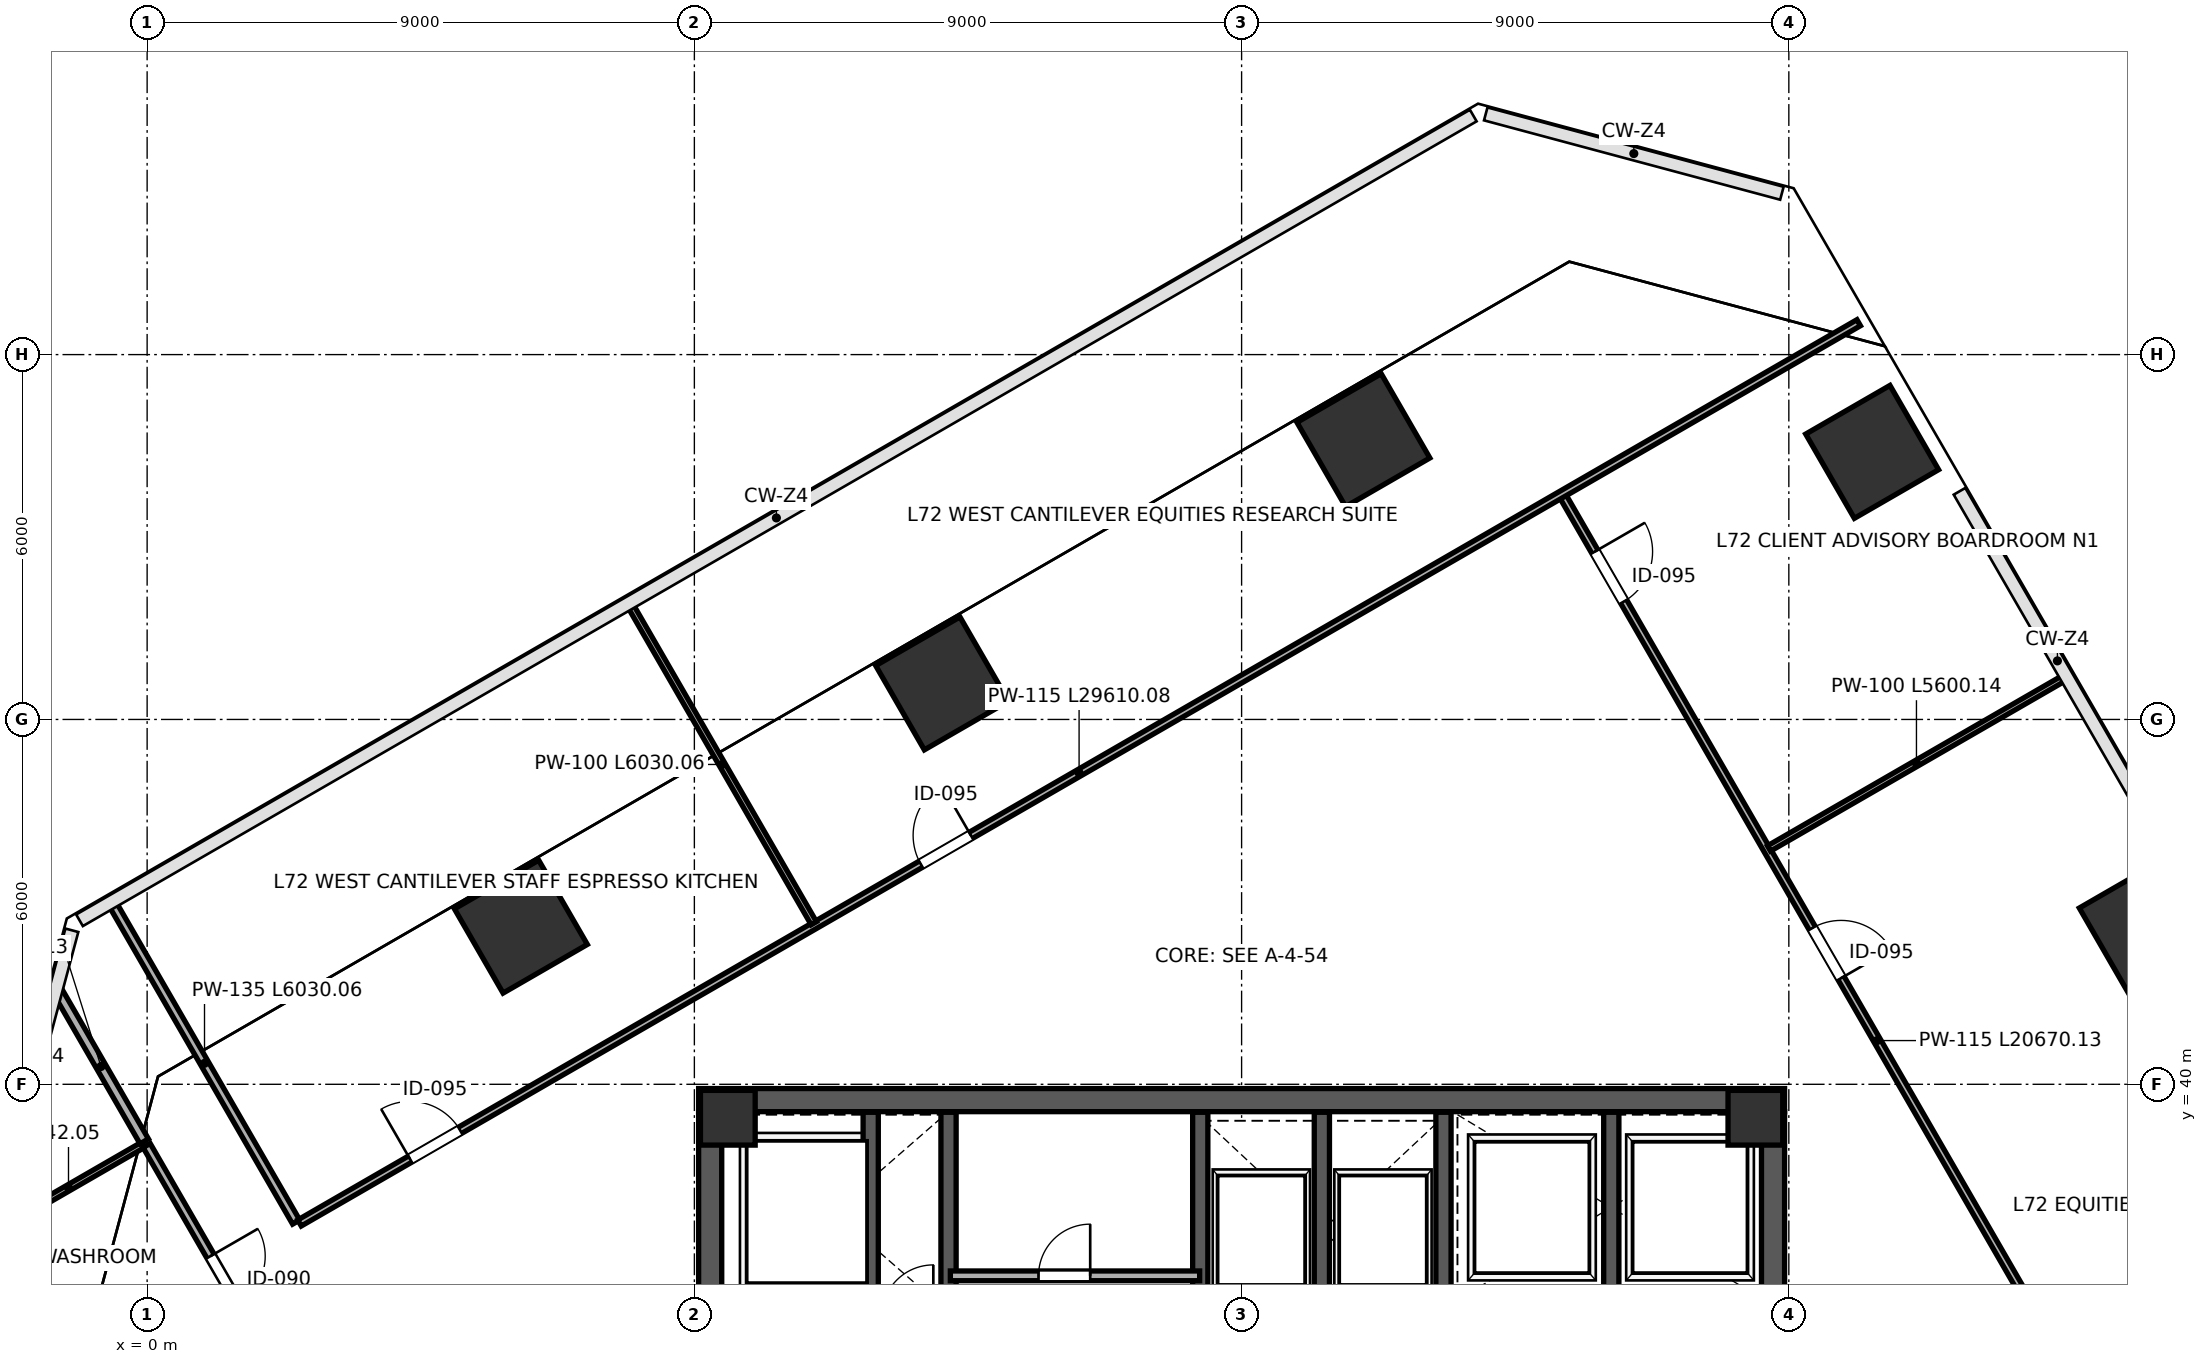
"""IFC4 building model, lengths in metres.
Left out: names, types, materials, properties, quantities, classifications, styles, units other than length and angle.
Written with IfcOpenShell. Run it as: python <this file> out.ifc"""

import sys

from ifc_helpers import new_model, si_unit, direction, frame, frame_2d, origin, origin_2d, place, context, subcontext, project, spatial, rectangle, extrude, source, transform, mapped, element, fill, save


model = new_model("IFC4")
c1 = context("Model", 3, precision=1e-05, world=origin(), true_north=direction((0.0, 1.0)))
c2 = subcontext(c1, "Body", "Model", "MODEL_VIEW")
j1 = project(units=[si_unit("LENGTHUNIT", "METRE"), si_unit("PLANEANGLEUNIT", "RADIAN")], contexts=[c1])
p1 = place(None, origin())
s1 = spatial("IfcSite", under=j1, at=p1, CompositionType="ELEMENT")
p2 = place(p1, origin())
s2 = spatial("IfcBuilding", under=s1, at=p2, CompositionType="ELEMENT")
p3 = place(p2, frame((0.0, 0.0, 319.8)))
s3 = spatial("IfcBuildingStorey", under=s2, at=p3, CompositionType="ELEMENT", Elevation=319.8)
m1 = source(origin(), c2, "Body", "SweptSolid", [
    extrude(rectangle(XDim=0.9, YDim=0.9, at=origin_2d()), origin(), (0.0, 0.0, 1.0), 4.198),
])
for number, where, z_axis, x_axis in (
    (1, (9.55, 39.45, 0.001), (0.0, 0.0, 1.0), (1.0, 0.0, 0.0)),
    (2, (26.45, 39.45, 0.001), (0.0, 0.0, 1.0), (1.0, 0.0, 0.0)),
):
    element("IfcColumn", number, at=place(p3, frame(where, z_axis=z_axis, x_axis=x_axis)), inside=s3, PredefinedType="COLUMN", context=c2, shape_type="MappedRepresentation", body=[
        mapped(m1, transform((0.0, 0.0, 0.0), scale=1.0)),
    ])
m2 = source(origin(), c2, "Body", "SweptSolid", [
    extrude(rectangle(XDim=1.6, YDim=1.6, at=origin_2d()), origin(), (0.0, 0.0, 1.0), 4.198),
])
for number, where, z_axis, x_axis in (
    (3, (28.37, 50.4, 0.001), (0.0, 0.0, 1.0), (-0.5, 0.866, 0.0)),
    (4, (32.87, 42.606, 0.001), (0.0, 0.0, 1.0), (-0.5, 0.866, 0.0)),
    (5, (6.147, 42.593, 0.001), (0.0, 0.0, 1.0), (-0.5, 0.866, 0.0)),
    (6, (13.075, 46.593, 0.001), (0.0, 0.0, 1.0), (-0.5, 0.866, 0.0)),
    (7, (20.003, 50.593, 0.001), (0.0, 0.0, 1.0), (-0.5, 0.866, 0.0)),
):
    element("IfcColumn", number, at=place(p3, frame(where, z_axis=z_axis, x_axis=x_axis)), inside=s3, PredefinedType="COLUMN", context=c2, shape_type="MappedRepresentation", body=[
        mapped(m2, transform((0.0, 0.0, 0.0), scale=1.0)),
    ])
p4 = place(p3, frame((9.26, 24.45, 0.0), z_axis=(0.0, 0.0, 1.0), x_axis=(0.0, 1.0, 0.0)))
e8 = element("IfcWall", 8, at=p4, inside=s3, PredefinedType="SHEAR", context=c2, shape_type="SweptSolid", body=[
    extrude(rectangle(XDim=15.1, YDim=0.38, at=frame_2d((7.55, 0.0))), origin(), (0.0, 0.0, 1.0), 3.96),
])
p5 = place(p4, frame((8.7, 0.0, 0.0)))
e9 = element("IfcOpeningElement", 9, at=p5, cuts=e8, PredefinedType="OPENING", context=c2, shape_type="SweptSolid", body=[
    extrude(rectangle(XDim=1.15, YDim=2.2, at=frame_2d((0.575, 1.1))), frame((0.0, 0.2, 0.0), z_axis=(0.0, -1.0, 0.0), x_axis=(1.0, 0.0, 0.0)), (0.0, 0.0, 1.0), 0.4),
])
p6 = place(p3, frame((26.74, 24.45, 0.0), z_axis=(0.0, 0.0, 1.0), x_axis=(0.0, 1.0, 0.0)))
e10 = element("IfcWall", 10, at=p6, inside=s3, PredefinedType="SHEAR", context=c2, shape_type="SweptSolid", body=[
    extrude(rectangle(XDim=15.1, YDim=0.38, at=frame_2d((7.55, 0.0))), origin(), (0.0, 0.0, 1.0), 3.96),
])
p7 = place(p6, frame((8.6, 0.0, 0.0)))
e11 = element("IfcOpeningElement", 11, at=p7, cuts=e10, PredefinedType="OPENING", context=c2, shape_type="SweptSolid", body=[
    extrude(rectangle(XDim=1.15, YDim=2.2, at=frame_2d((0.575, 1.1))), frame((0.0, 0.2, 0.0), z_axis=(0.0, -1.0, 0.0), x_axis=(1.0, 0.0, 0.0)), (0.0, 0.0, 1.0), 0.4),
])
p8 = place(p3, frame((9.07, 39.74, 0.0), z_axis=(0.0, 0.0, 1.0), x_axis=(1.0, 0.0, 0.0)))
e12 = element("IfcWall", 12, at=p8, inside=s3, PredefinedType="SHEAR", context=c2, shape_type="SweptSolid", body=[
    extrude(rectangle(XDim=17.86, YDim=0.38, at=frame_2d((8.93, 0.0))), origin(), (0.0, 0.0, 1.0), 3.96),
])
p9 = place(p3, frame((21.32, 32.12, 0.0), z_axis=(0.0, 0.0, 1.0), x_axis=(0.0, 1.0, 0.0)))
e13 = element("IfcWall", 13, at=p9, inside=s3, PredefinedType="SHEAR", context=c2, shape_type="SweptSolid", body=[
    extrude(rectangle(XDim=7.42, YDim=0.25, at=frame_2d((3.71, 0.0))), origin(), (0.0, 0.0, 1.0), 3.96),
])
p10 = place(p9, frame((1.4, 0.0, 0.0)))
e14 = element("IfcOpeningElement", 14, at=p10, cuts=e13, PredefinedType="OPENING", context=c2, shape_type="SweptSolid", body=[
    extrude(rectangle(XDim=1.15, YDim=2.2, at=frame_2d((0.575, 1.1))), frame((0.0, 0.135, 0.0), z_axis=(0.0, -1.0, 0.0), x_axis=(1.0, 0.0, 0.0)), (0.0, 0.0, 1.0), 0.27),
])
p11 = place(p3, frame((11.9, 36.31, 0.0), z_axis=(0.0, 0.0, 1.0), x_axis=(0.0, 1.0, 0.0)))
e15 = element("IfcWall", 15, at=p11, inside=s3, PredefinedType="SHEAR", context=c2, shape_type="SweptSolid", body=[
    extrude(rectangle(XDim=3.23, YDim=0.25, at=frame_2d((1.615, 0.0))), origin(), (0.0, 0.0, 1.0), 3.96),
])
p12 = place(p3, frame((24.08, 36.48, 0.0), z_axis=(0.0, 0.0, 1.0), x_axis=(0.0, 1.0, 0.0)))
e16 = element("IfcWall", 16, at=p12, inside=s3, PredefinedType="SHEAR", context=c2, shape_type="SweptSolid", body=[
    extrude(rectangle(XDim=3.06, YDim=0.25, at=frame_2d((1.53, 0.0))), origin(), (0.0, 0.0, 1.0), 3.96),
])
p13 = place(p3, frame((13.18, 36.2, 0.0), z_axis=(0.0, 0.0, 1.0), x_axis=(0.0, 1.0, 0.0)))
e17 = element("IfcWall", 17, at=p13, inside=s3, PredefinedType="SHEAR", context=c2, shape_type="SweptSolid", body=[
    extrude(rectangle(XDim=3.34, YDim=0.25, at=frame_2d((1.67, 0.0))), origin(), (0.0, 0.0, 1.0), 3.96),
])
for number, where, z_axis, x_axis in (
    (18, (17.32, 35.81, 0.0), (0.0, 0.0, 1.0), (0.0, 1.0, 0.0)),
    (19, (19.32, 35.81, 0.0), (0.0, 0.0, 1.0), (0.0, 1.0, 0.0)),
):
    element("IfcWall", number, at=place(p3, frame(where, z_axis=z_axis, x_axis=x_axis)), inside=s3, PredefinedType="SHEAR", context=c2, shape_type="SweptSolid", body=[
        extrude(rectangle(XDim=3.73, YDim=0.25, at=frame_2d((1.865, 0.0))), origin(), (0.0, 0.0, 1.0), 3.96),
    ])
p14 = place(p3, frame((13.21, 36.85, 0.0), z_axis=(0.0, 0.0, 1.0), x_axis=(1.0, 0.0, 0.0)))
e20 = element("IfcWall", 20, at=p14, inside=s3, PredefinedType="PARTITIONING", context=c2, shape_type="SweptSolid", body=[
    extrude(rectangle(XDim=4.1, YDim=0.16, at=frame_2d((2.05, 0.0))), origin(), (0.0, 0.0, 1.0), 3.96),
])
p15 = place(p14, frame((1.45, 0.0, 0.0)))
e21 = element("IfcOpeningElement", 21, at=p15, cuts=e20, PredefinedType="OPENING", context=c2, shape_type="SweptSolid", body=[
    extrude(rectangle(XDim=0.85, YDim=2.1, at=frame_2d((0.425, 1.05))), frame((0.0, 0.09, 0.0), z_axis=(0.0, -1.0, 0.0), x_axis=(1.0, 0.0, 0.0)), (0.0, 0.0, 1.0), 0.18),
])
p16 = place(p3, frame((-2.524, 37.586, 0.0), z_axis=(0.0, 0.0, 1.0), x_axis=(0.866019653938, 0.500009958894, 0.0)))
e22 = element("IfcWall", 22, at=p16, inside=s3, PredefinedType="PARTITIONING", context=c2, shape_type="SweptSolid", body=[
    extrude(rectangle(XDim=2.842, YDim=0.1, at=frame_2d((1.421, 0.0))), origin(), (0.0, 0.0, 1.0), 3.96),
])
p17 = place(p3, frame((-1.469, 41.523, 0.0), z_axis=(0.0, 0.0, 1.0), x_axis=(0.499945532396, -0.866056848387, 0.0)))
e23 = element("IfcWall", 23, at=p17, inside=s3, PredefinedType="PARTITIONING", context=c2, shape_type="SweptSolid", body=[
    extrude(rectangle(XDim=2.842, YDim=0.16, at=frame_2d((1.421, 0.0))), origin(), (0.0, 0.0, 1.0), 3.96),
])
p18 = place(p3, frame((-0.008, 38.993, 0.0), z_axis=(0.0, 0.0, 1.0), x_axis=(0.49998923004, -0.866031621735, 0.0)))
e24 = element("IfcWall", 24, at=p18, inside=s3, PredefinedType="PARTITIONING", context=c2, shape_type="SweptSolid", body=[
    extrude(rectangle(XDim=7.42, YDim=0.135, at=frame_2d((3.71, 0.0))), origin(), (0.0, 0.0, 1.0), 3.96),
])
p19 = place(p18, frame((2.1, 0.0, 0.0)))
e25 = element("IfcOpeningElement", 25, at=p19, cuts=e24, PredefinedType="OPENING", context=c2, shape_type="SweptSolid", body=[
    extrude(rectangle(XDim=0.9, YDim=2.15, at=frame_2d((0.45, 1.075))), frame((0.0, 0.078, 0.0), z_axis=(0.0, -1.0, 0.0), x_axis=(1.0, 0.0, 0.0)), (0.0, 0.0, 1.0), 0.155),
])
p20 = place(p18, frame((5.4, 0.0, 0.0)))
e26 = element("IfcOpeningElement", 26, at=p20, cuts=e24, PredefinedType="OPENING", context=c2, shape_type="SweptSolid", body=[
    extrude(rectangle(XDim=0.95, YDim=2.15, at=frame_2d((0.475, 1.075))), frame((0.0, 0.078, 0.0), z_axis=(0.0, -1.0, 0.0), x_axis=(1.0, 0.0, 0.0)), (0.0, 0.0, 1.0), 0.155),
])
p21 = place(p3, frame((23.284, 49.669, 0.0), z_axis=(0.0, 0.0, 1.0), x_axis=(0.500004637929, -0.866022726058, 0.0)))
e27 = element("IfcWall", 27, at=p21, inside=s3, PredefinedType="PARTITIONING", context=c2, shape_type="SweptSolid", body=[
    extrude(rectangle(XDim=20.67, YDim=0.115, at=frame_2d((10.335, 0.0))), origin(), (0.0, 0.0, 1.0), 3.96),
])
p22 = place(p21, frame((1.05, 0.0, 0.0)))
e28 = element("IfcOpeningElement", 28, at=p22, cuts=e27, PredefinedType="OPENING", context=c2, shape_type="SweptSolid", body=[
    extrude(rectangle(XDim=0.95, YDim=2.15, at=frame_2d((0.475, 1.075))), frame((0.0, 0.067, 0.0), z_axis=(0.0, -1.0, 0.0), x_axis=(1.0, 0.0, 0.0)), (0.0, 0.0, 1.0), 0.135),
])
p23 = place(p21, frame((8.2, 0.0, 0.0)))
e29 = element("IfcOpeningElement", 29, at=p23, cuts=e27, PredefinedType="OPENING", context=c2, shape_type="SweptSolid", body=[
    extrude(rectangle(XDim=0.95, YDim=2.15, at=frame_2d((0.475, 1.075))), frame((0.0, 0.067, 0.0), z_axis=(0.0, -1.0, 0.0), x_axis=(1.0, 0.0, 0.0)), (0.0, 0.0, 1.0), 0.135),
])
p24 = place(p3, frame((26.674, 43.878, 0.0), z_axis=(0.0, 0.0, 1.0), x_axis=(0.866026594901, 0.49999793692, 0.0)))
e30 = element("IfcWall", 30, at=p24, inside=s3, PredefinedType="PARTITIONING", context=c2, shape_type="SweptSolid", body=[
    extrude(rectangle(XDim=5.6, YDim=0.1, at=frame_2d((2.8, 0.0))), origin(), (0.0, 0.0, 1.0), 3.295),
])
p25 = place(p3, frame((-0.564, 42.956, 0.0), z_axis=(0.0, 0.0, 1.0), x_axis=(0.500014506688, -0.866017028182, 0.0)))
e31 = element("IfcWall", 31, at=p25, inside=s3, PredefinedType="PARTITIONING", context=c2, shape_type="SweptSolid", body=[
    extrude(rectangle(XDim=6.03, YDim=0.135, at=frame_2d((3.015, 0.0))), origin(), (0.0, 0.0, 1.0), 3.96),
])
p26 = place(p3, frame((2.506, 37.719, 0.0), z_axis=(0.0, 0.0, 1.0), x_axis=(0.866023290802, 0.500003659775, 0.0)))
e32 = element("IfcWall", 32, at=p26, inside=s3, PredefinedType="PARTITIONING", context=c2, shape_type="SweptSolid", body=[
    extrude(rectangle(XDim=29.61, YDim=0.115, at=frame_2d((14.805, 0.0))), origin(), (0.0, 0.0, 1.0), 3.96),
])
p27 = place(p26, frame((2.1, 0.0, 0.0)))
e33 = element("IfcOpeningElement", 33, at=p27, cuts=e32, PredefinedType="OPENING", context=c2, shape_type="SweptSolid", body=[
    extrude(rectangle(XDim=0.95, YDim=2.15, at=frame_2d((0.475, 1.075))), frame((0.0, 0.067, 0.0), z_axis=(0.0, -1.0, 0.0), x_axis=(1.0, 0.0, 0.0)), (0.0, 0.0, 1.0), 0.135),
])
p28 = place(p26, frame((11.8, 0.0, 0.0)))
e34 = element("IfcOpeningElement", 34, at=p28, cuts=e32, PredefinedType="OPENING", context=c2, shape_type="SweptSolid", body=[
    extrude(rectangle(XDim=0.95, YDim=2.15, at=frame_2d((0.475, 1.075))), frame((0.0, 0.067, 0.0), z_axis=(0.0, -1.0, 0.0), x_axis=(1.0, 0.0, 0.0)), (0.0, 0.0, 1.0), 0.135),
])
p29 = place(p3, frame((7.949, 47.871, 0.0), z_axis=(0.0, 0.0, 1.0), x_axis=(0.4999841411, -0.866034559731, 0.0)))
e35 = element("IfcWall", 35, at=p29, inside=s3, PredefinedType="PARTITIONING", context=c2, shape_type="SweptSolid", body=[
    extrude(rectangle(XDim=6.03, YDim=0.1, at=frame_2d((3.015, 0.0))), origin(), (0.0, 0.0, 1.0), 3.295),
])
m3 = source(origin(), c2, "Body", "SweptSolid", [
    extrude(rectangle(XDim=0.85, YDim=2.1, at=frame_2d((0.425, 1.05))), frame((0.0, 0.025, 0.0), z_axis=(0.0, -1.0, 0.0), x_axis=(1.0, 0.0, 0.0)), (0.0, 0.0, 1.0), 0.05),
])
p30 = place(p15, origin())
e36 = element("IfcDoor", 36, at=p30, inside=s3, OperationType="SINGLE_SWING_RIGHT", PredefinedType="DOOR", context=c2, shape_type="MappedRepresentation", body=[
    mapped(m3, transform((0.0, 0.0, 0.0), scale=1.0)),
])
fill(e21, e36)
m4 = source(origin(), c2, "Body", "SweptSolid", [
    extrude(rectangle(XDim=0.9, YDim=2.15, at=frame_2d((0.45, 1.075))), frame((0.0, 0.025, 0.0), z_axis=(0.0, -1.0, 0.0), x_axis=(1.0, 0.0, 0.0)), (0.0, 0.0, 1.0), 0.05),
])
p31 = place(p19, origin())
e37 = element("IfcDoor", 37, at=p31, inside=s3, OperationType="SINGLE_SWING_LEFT", PredefinedType="DOOR", context=c2, shape_type="MappedRepresentation", body=[
    mapped(m4, transform((0.0, 0.0, 0.0), scale=1.0)),
])
fill(e25, e37)
m5 = source(origin(), c2, "Body", "SweptSolid", [
    extrude(rectangle(XDim=0.95, YDim=2.15, at=frame_2d((0.475, 1.075))), frame((0.0, 0.025, 0.0), z_axis=(0.0, -1.0, 0.0), x_axis=(1.0, 0.0, 0.0)), (0.0, 0.0, 1.0), 0.05),
])
p32 = place(p22, origin())
e38 = element("IfcDoor", 38, at=p32, inside=s3, OperationType="SINGLE_SWING_LEFT", PredefinedType="DOOR", context=c2, shape_type="MappedRepresentation", body=[
    mapped(m5, transform((0.0, 0.0, 0.0), scale=1.0)),
])
fill(e28, e38)
p33 = place(p23, origin())
e39 = element("IfcDoor", 39, at=p33, inside=s3, OperationType="SINGLE_SWING_RIGHT", PredefinedType="DOOR", context=c2, shape_type="MappedRepresentation", body=[
    mapped(m5, transform((0.0, 0.0, 0.0), scale=1.0)),
])
fill(e29, e39)
p34 = place(p27, origin())
e40 = element("IfcDoor", 40, at=p34, inside=s3, OperationType="SINGLE_SWING_LEFT", PredefinedType="DOOR", context=c2, shape_type="MappedRepresentation", body=[
    mapped(m5, transform((0.0, 0.0, 0.0), scale=1.0)),
])
fill(e33, e40)
p35 = place(p28, origin())
e41 = element("IfcDoor", 41, at=p35, inside=s3, OperationType="SINGLE_SWING_RIGHT", PredefinedType="DOOR", context=c2, shape_type="MappedRepresentation", body=[
    mapped(m5, transform((0.0, 0.0, 0.0), scale=1.0)),
])
fill(e34, e41)
save(model, sys.argv[1])
